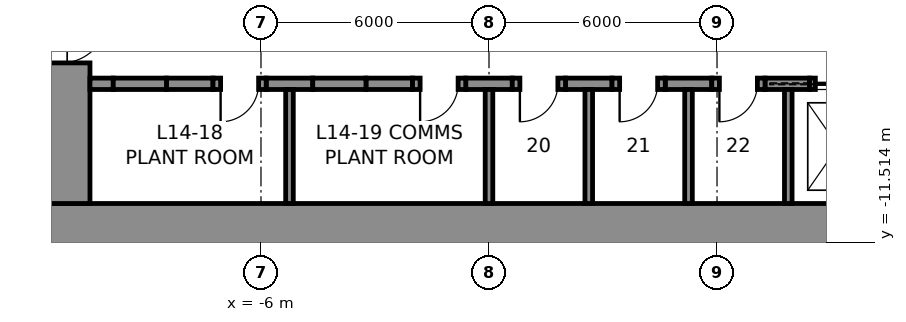
"""IFC4 building model, lengths in metres.
Left out: names, types, materials, properties, quantities, classifications, styles, units other than length and angle.
Written with IfcOpenShell. Run it as: python <this file> out.ifc"""

import sys

from ifc_helpers import new_model, si_unit, direction, frame, frame_2d, origin, place, context, subcontext, project, spatial, rectangle, extrude, element, fill, save


model = new_model("IFC4")
c1 = context("Model", 3, precision=1e-05, world=origin(), true_north=direction((0.0, 1.0)))
c2 = subcontext(c1, "Body", "Model", "MODEL_VIEW")
j1 = project(units=[si_unit("LENGTHUNIT", "METRE"), si_unit("PLANEANGLEUNIT", "RADIAN")], contexts=[c1])
p1 = place(None, origin())
s1 = spatial("IfcSite", under=j1, at=p1, CompositionType="ELEMENT")
p2 = place(p1, origin())
s2 = spatial("IfcBuilding", under=s1, at=p2, CompositionType="ELEMENT")
p3 = place(p2, frame((0.0, 0.0, 76.0)))
s3 = spatial("IfcBuildingStorey", under=s2, at=p3, CompositionType="ELEMENT", Elevation=76.0)
p4 = place(p3, frame((12.0, -11.25, 0.0), z_axis=(0.0, 0.0, 1.0), x_axis=(-1.0, 0.0, 0.0)))
e1 = element("IfcWall", 1, at=p4, inside=s3, PredefinedType="SHEAR", context=c2, shape_type="SweptSolid", body=[
    extrude(rectangle(XDim=24.0, YDim=1.5, at=frame_2d((12.0, 0.0))), origin(), (0.0, 0.0, 1.0), 5.0),
])
p5 = place(p3, frame((-11.25, -10.5, 0.0), z_axis=(0.0, 0.0, 1.0), x_axis=(0.0, 1.0, 0.0)))
e2 = element("IfcWall", 2, at=p5, inside=s3, PredefinedType="SHEAR", context=c2, shape_type="SweptSolid", body=[
    extrude(rectangle(XDim=21.0, YDim=1.5, at=frame_2d((10.5, 0.0))), origin(), (0.0, 0.0, 1.0), 5.0),
])
p6 = place(p5, frame((16.1, 0.0, 0.0)))
e3 = element("IfcOpeningElement", 3, at=p6, cuts=e2, PredefinedType="OPENING", context=c2, shape_type="SweptSolid", body=[
    extrude(rectangle(XDim=1.2, YDim=2.3, at=frame_2d((0.6, 1.15))), frame((0.0, 0.76, 0.0), z_axis=(0.0, -1.0, 0.0), x_axis=(1.0, 0.0, 0.0)), (0.0, 0.0, 1.0), 1.52),
])
p7 = place(p5, frame((3.7, 0.0, 0.0)))
e4 = element("IfcOpeningElement", 4, at=p7, cuts=e2, PredefinedType="OPENING", context=c2, shape_type="SweptSolid", body=[
    extrude(rectangle(XDim=1.2, YDim=2.3, at=frame_2d((0.6, 1.15))), frame((0.0, 0.76, 0.0), z_axis=(0.0, -1.0, 0.0), x_axis=(1.0, 0.0, 0.0)), (0.0, 0.0, 1.0), 1.52),
])
p8 = place(p3, frame((-10.5, -7.35, 0.0), z_axis=(0.0, 0.0, 1.0), x_axis=(1.0, 0.0, 0.0)))
e5 = element("IfcWall", 5, at=p8, inside=s3, PredefinedType="SHEAR", context=c2, shape_type="SweptSolid", body=[
    extrude(rectangle(XDim=0.613, YDim=0.3, at=frame_2d((0.306, 0.0))), origin(), (0.0, 0.0, 1.0), 5.0),
])
for number, where, z_axis, x_axis in (
    (6, (-8.488, -7.35, 0.0), (0.0, 0.0, 1.0), (1.0, 0.0, 0.0)),
    (7, (-5.863, -7.35, 0.0), (0.0, 0.0, 1.0), (1.0, 0.0, 0.0)),
    (8, (-3.238, -7.35, 0.0), (0.0, 0.0, 1.0), (1.0, 0.0, 0.0)),
    (9, (-0.613, -7.35, 0.0), (0.0, 0.0, 1.0), (1.0, 0.0, 0.0)),
    (10, (2.012, -7.35, 0.0), (0.0, 0.0, 1.0), (1.0, 0.0, 0.0)),
    (11, (4.637, -7.35, 0.0), (0.0, 0.0, 1.0), (1.0, 0.0, 0.0)),
):
    element("IfcWall", number, at=place(p3, frame(where, z_axis=z_axis, x_axis=x_axis)), inside=s3, PredefinedType="SHEAR", context=c2, shape_type="SweptSolid", body=[
        extrude(rectangle(XDim=1.225, YDim=0.3, at=frame_2d((0.613, 0.0))), origin(), (0.0, 0.0, 1.0), 5.0),
    ])
p9 = place(p3, frame((7.262, -7.35, 0.0), z_axis=(0.0, 0.0, 1.0), x_axis=(1.0, 0.0, 0.0)))
e12 = element("IfcWall", 12, at=p9, inside=s3, PredefinedType="SHEAR", context=c2, shape_type="SweptSolid", body=[
    extrude(rectangle(XDim=1.175, YDim=0.3, at=frame_2d((0.587, 0.0))), origin(), (0.0, 0.0, 1.0), 5.0),
])
p10 = place(p3, frame((-9.887, -7.35, 0.0), z_axis=(0.0, 0.0, 1.0), x_axis=(1.0, 0.0, 0.0)))
e13 = element("IfcWall", 13, at=p10, inside=s3, PredefinedType="PARTITIONING", context=c2, shape_type="SweptSolid", body=[
    extrude(rectangle(XDim=1.4, YDim=0.3, at=frame_2d((0.7, 0.0))), origin(), (0.0, 0.0, 1.0), 5.0),
])
p11 = place(p3, frame((-7.262, -7.35, 0.0), z_axis=(0.0, 0.0, 1.0), x_axis=(1.0, 0.0, 0.0)))
e14 = element("IfcWall", 14, at=p11, inside=s3, PredefinedType="PARTITIONING", context=c2, shape_type="SweptSolid", body=[
    extrude(rectangle(XDim=1.4, YDim=0.3, at=frame_2d((0.7, 0.0))), origin(), (0.0, 0.0, 1.0), 5.0),
])
p12 = place(p11, frame((0.2, 0.0, 0.0)))
e15 = element("IfcOpeningElement", 15, at=p12, cuts=e14, PredefinedType="OPENING", context=c2, shape_type="SweptSolid", body=[
    extrude(rectangle(XDim=1.0, YDim=2.3, at=frame_2d((0.5, 1.15))), frame((0.0, 0.16, 0.0), z_axis=(0.0, -1.0, 0.0), x_axis=(1.0, 0.0, 0.0)), (0.0, 0.0, 1.0), 0.32),
])
p13 = place(p3, frame((-4.637, -7.35, 0.0), z_axis=(0.0, 0.0, 1.0), x_axis=(1.0, 0.0, 0.0)))
e16 = element("IfcWall", 16, at=p13, inside=s3, PredefinedType="PARTITIONING", context=c2, shape_type="SweptSolid", body=[
    extrude(rectangle(XDim=1.4, YDim=0.3, at=frame_2d((0.7, 0.0))), origin(), (0.0, 0.0, 1.0), 5.0),
])
p14 = place(p3, frame((-2.012, -7.35, 0.0), z_axis=(0.0, 0.0, 1.0), x_axis=(1.0, 0.0, 0.0)))
e17 = element("IfcWall", 17, at=p14, inside=s3, PredefinedType="PARTITIONING", context=c2, shape_type="SweptSolid", body=[
    extrude(rectangle(XDim=1.4, YDim=0.3, at=frame_2d((0.7, 0.0))), origin(), (0.0, 0.0, 1.0), 5.0),
])
p15 = place(p14, frame((0.2, 0.0, 0.0)))
e18 = element("IfcOpeningElement", 18, at=p15, cuts=e17, PredefinedType="OPENING", context=c2, shape_type="SweptSolid", body=[
    extrude(rectangle(XDim=1.0, YDim=2.3, at=frame_2d((0.5, 1.15))), frame((0.0, 0.16, 0.0), z_axis=(0.0, -1.0, 0.0), x_axis=(1.0, 0.0, 0.0)), (0.0, 0.0, 1.0), 0.32),
])
p16 = place(p3, frame((0.613, -7.35, 0.0), z_axis=(0.0, 0.0, 1.0), x_axis=(1.0, 0.0, 0.0)))
e19 = element("IfcWall", 19, at=p16, inside=s3, PredefinedType="PARTITIONING", context=c2, shape_type="SweptSolid", body=[
    extrude(rectangle(XDim=1.4, YDim=0.3, at=frame_2d((0.7, 0.0))), origin(), (0.0, 0.0, 1.0), 5.0),
])
p17 = place(p16, frame((0.2, 0.0, 0.0)))
e20 = element("IfcOpeningElement", 20, at=p17, cuts=e19, PredefinedType="OPENING", context=c2, shape_type="SweptSolid", body=[
    extrude(rectangle(XDim=1.0, YDim=2.3, at=frame_2d((0.5, 1.15))), frame((0.0, 0.16, 0.0), z_axis=(0.0, -1.0, 0.0), x_axis=(1.0, 0.0, 0.0)), (0.0, 0.0, 1.0), 0.32),
])
p18 = place(p3, frame((3.238, -7.35, 0.0), z_axis=(0.0, 0.0, 1.0), x_axis=(1.0, 0.0, 0.0)))
e21 = element("IfcWall", 21, at=p18, inside=s3, PredefinedType="PARTITIONING", context=c2, shape_type="SweptSolid", body=[
    extrude(rectangle(XDim=1.4, YDim=0.3, at=frame_2d((0.7, 0.0))), origin(), (0.0, 0.0, 1.0), 5.0),
])
p19 = place(p18, frame((0.2, 0.0, 0.0)))
e22 = element("IfcOpeningElement", 22, at=p19, cuts=e21, PredefinedType="OPENING", context=c2, shape_type="SweptSolid", body=[
    extrude(rectangle(XDim=1.0, YDim=2.3, at=frame_2d((0.5, 1.15))), frame((0.0, 0.16, 0.0), z_axis=(0.0, -1.0, 0.0), x_axis=(1.0, 0.0, 0.0)), (0.0, 0.0, 1.0), 0.32),
])
p20 = place(p3, frame((5.863, -7.35, 0.0), z_axis=(0.0, 0.0, 1.0), x_axis=(1.0, 0.0, 0.0)))
e23 = element("IfcWall", 23, at=p20, inside=s3, PredefinedType="PARTITIONING", context=c2, shape_type="SweptSolid", body=[
    extrude(rectangle(XDim=1.4, YDim=0.3, at=frame_2d((0.7, 0.0))), origin(), (0.0, 0.0, 1.0), 5.0),
])
p21 = place(p20, frame((0.2, 0.0, 0.0)))
e24 = element("IfcOpeningElement", 24, at=p21, cuts=e23, PredefinedType="OPENING", context=c2, shape_type="SweptSolid", body=[
    extrude(rectangle(XDim=1.0, YDim=2.3, at=frame_2d((0.5, 1.15))), frame((0.0, 0.16, 0.0), z_axis=(0.0, -1.0, 0.0), x_axis=(1.0, 0.0, 0.0)), (0.0, 0.0, 1.0), 0.32),
])
p22 = place(p3, frame((8.438, -7.35, 0.0), z_axis=(0.0, 0.0, 1.0), x_axis=(1.0, 0.0, 0.0)))
e25 = element("IfcWall", 25, at=p22, inside=s3, PredefinedType="PARTITIONING", context=c2, shape_type="SweptSolid", body=[
    extrude(rectangle(XDim=1.5, YDim=0.3, at=frame_2d((0.75, 0.0))), origin(), (0.0, 0.0, 1.0), 5.0),
])
p23 = place(p22, frame((0.15, 0.0, 0.0)))
e26 = element("IfcOpeningElement", 26, at=p23, cuts=e25, PredefinedType="OPENING", context=c2, shape_type="SweptSolid", body=[
    extrude(rectangle(XDim=1.2, YDim=2.3, at=frame_2d((0.6, 1.15))), frame((0.0, 0.16, 0.0), z_axis=(0.0, -1.0, 0.0), x_axis=(1.0, 0.0, 0.0)), (0.0, 0.0, 1.0), 0.32),
])
for number, where, z_axis, x_axis in (
    (27, (-5.25, -10.5, 0.0), (0.0, 0.0, 1.0), (0.0, 1.0, 0.0)),
    (28, (0.0, -10.5, 0.0), (0.0, 0.0, 1.0), (0.0, 1.0, 0.0)),
    (29, (2.625, -10.5, 0.0), (0.0, 0.0, 1.0), (0.0, 1.0, 0.0)),
    (30, (5.25, -10.5, 0.0), (0.0, 0.0, 1.0), (0.0, 1.0, 0.0)),
    (31, (7.875, -10.5, 0.0), (0.0, 0.0, 1.0), (0.0, 1.0, 0.0)),
):
    element("IfcWall", number, at=place(p3, frame(where, z_axis=z_axis, x_axis=x_axis)), inside=s3, PredefinedType="PARTITIONING", context=c2, shape_type="SweptSolid", body=[
        extrude(rectangle(XDim=3.0, YDim=0.2, at=frame_2d((1.5, 0.0))), origin(), (0.0, 0.0, 1.0), 5.0),
    ])
p24 = place(p12, frame((1.0, 0.0, 0.0), z_axis=(0.0, 0.0, 1.0), x_axis=(-1.0, 0.0, 0.0)))
e32 = element("IfcDoor", 32, at=p24, inside=s3, OperationType="SINGLE_SWING_RIGHT", PredefinedType="DOOR", context=c2, shape_type="SweptSolid", body=[
    extrude(rectangle(XDim=1.0, YDim=2.3, at=frame_2d((0.5, 1.15))), frame((0.0, 0.025, 0.0), z_axis=(0.0, -1.0, 0.0), x_axis=(1.0, 0.0, 0.0)), (0.0, 0.0, 1.0), 0.05),
])
fill(e15, e32)
p25 = place(p15, frame((1.0, 0.0, 0.0), z_axis=(0.0, 0.0, 1.0), x_axis=(-1.0, 0.0, 0.0)))
e33 = element("IfcDoor", 33, at=p25, inside=s3, OperationType="SINGLE_SWING_RIGHT", PredefinedType="DOOR", context=c2, shape_type="SweptSolid", body=[
    extrude(rectangle(XDim=1.0, YDim=2.3, at=frame_2d((0.5, 1.15))), frame((0.0, 0.025, 0.0), z_axis=(0.0, -1.0, 0.0), x_axis=(1.0, 0.0, 0.0)), (0.0, 0.0, 1.0), 0.05),
])
fill(e18, e33)
p26 = place(p17, frame((1.0, 0.0, 0.0), z_axis=(0.0, 0.0, 1.0), x_axis=(-1.0, 0.0, 0.0)))
e34 = element("IfcDoor", 34, at=p26, inside=s3, OperationType="SINGLE_SWING_RIGHT", PredefinedType="DOOR", context=c2, shape_type="SweptSolid", body=[
    extrude(rectangle(XDim=1.0, YDim=2.3, at=frame_2d((0.5, 1.15))), frame((0.0, 0.025, 0.0), z_axis=(0.0, -1.0, 0.0), x_axis=(1.0, 0.0, 0.0)), (0.0, 0.0, 1.0), 0.05),
])
fill(e20, e34)
p27 = place(p19, frame((1.0, 0.0, 0.0), z_axis=(0.0, 0.0, 1.0), x_axis=(-1.0, 0.0, 0.0)))
e35 = element("IfcDoor", 35, at=p27, inside=s3, OperationType="SINGLE_SWING_RIGHT", PredefinedType="DOOR", context=c2, shape_type="SweptSolid", body=[
    extrude(rectangle(XDim=1.0, YDim=2.3, at=frame_2d((0.5, 1.15))), frame((0.0, 0.025, 0.0), z_axis=(0.0, -1.0, 0.0), x_axis=(1.0, 0.0, 0.0)), (0.0, 0.0, 1.0), 0.05),
])
fill(e22, e35)
p28 = place(p21, frame((1.0, 0.0, 0.0), z_axis=(0.0, 0.0, 1.0), x_axis=(-1.0, 0.0, 0.0)))
e36 = element("IfcDoor", 36, at=p28, inside=s3, OperationType="SINGLE_SWING_RIGHT", PredefinedType="DOOR", context=c2, shape_type="SweptSolid", body=[
    extrude(rectangle(XDim=1.0, YDim=2.3, at=frame_2d((0.5, 1.15))), frame((0.0, 0.025, 0.0), z_axis=(0.0, -1.0, 0.0), x_axis=(1.0, 0.0, 0.0)), (0.0, 0.0, 1.0), 0.05),
])
fill(e24, e36)
p29 = place(p7, frame((1.2, 0.0, 0.0), z_axis=(0.0, 0.0, 1.0), x_axis=(-1.0, 0.0, 0.0)))
e37 = element("IfcDoor", 37, at=p29, inside=s3, OperationType="SINGLE_SWING_LEFT", PredefinedType="DOOR", context=c2, shape_type="SweptSolid", body=[
    extrude(rectangle(XDim=1.2, YDim=2.3, at=frame_2d((0.6, 1.15))), frame((0.0, 0.025, 0.0), z_axis=(0.0, -1.0, 0.0), x_axis=(1.0, 0.0, 0.0)), (0.0, 0.0, 1.0), 0.05),
])
fill(e4, e37)
p30 = place(p23, origin())
e38 = element("IfcDoor", 38, at=p30, inside=s3, OperationType="SLIDING_TO_LEFT", PredefinedType="DOOR", context=c2, shape_type="SweptSolid", body=[
    extrude(rectangle(XDim=1.2, YDim=2.3, at=frame_2d((0.6, 1.15))), frame((0.0, 0.025, 0.0), z_axis=(0.0, -1.0, 0.0), x_axis=(1.0, 0.0, 0.0)), (0.0, 0.0, 1.0), 0.05),
])
fill(e26, e38)
save(model, sys.argv[1])
